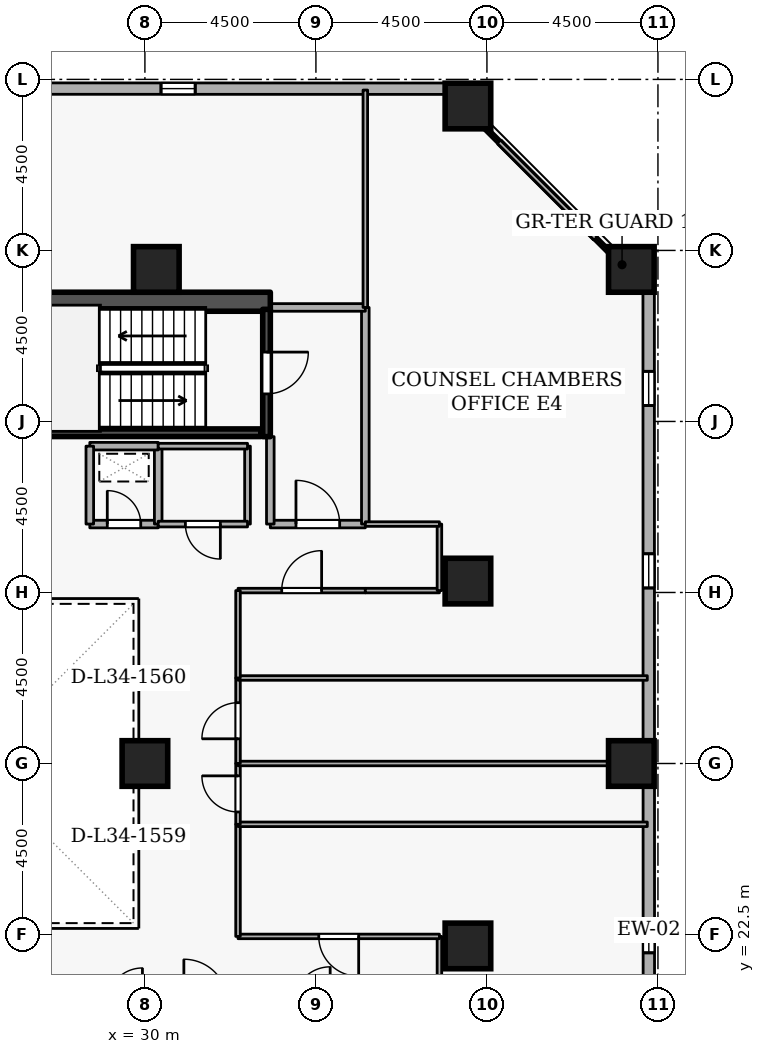
"""IFC4 building model, lengths in metres.
Left out: names, types, materials, properties, quantities, classifications, styles, units other than length and angle.
Written with IfcOpenShell. Run it as: python <this file> out.ifc"""

import sys

from ifc_helpers import new_model, si_unit, direction, frame, frame_2d, origin, origin_2d, place, context, subcontext, project, spatial, rectangle, extrude, element, fill, save


model = new_model("IFC4")
c1 = context("Model", 3, precision=1e-05, world=origin(), true_north=direction((0.0, 1.0)))
c2 = subcontext(c1, "Body", "Model", "MODEL_VIEW")
j1 = project(units=[si_unit("LENGTHUNIT", "METRE"), si_unit("PLANEANGLEUNIT", "RADIAN")], contexts=[c1])
p1 = place(None, origin())
s1 = spatial("IfcSite", under=j1, at=p1, CompositionType="ELEMENT")
p2 = place(p1, origin())
s2 = spatial("IfcBuilding", under=s1, at=p2, CompositionType="ELEMENT")
p3 = place(p2, frame((0.0, 0.0, 130.5)))
s3 = spatial("IfcBuildingStorey", under=s2, at=p3, CompositionType="ELEMENT", Elevation=130.5)
p4 = place(p3, frame((17.7, 39.15, 0.0), z_axis=(0.0, 0.0, 1.0), x_axis=(1.0, 0.0, 0.0)))
e1 = element("IfcWall", 1, at=p4, inside=s3, PredefinedType="SHEAR", context=c2, shape_type="SweptSolid", body=[
    extrude(rectangle(XDim=15.6, YDim=0.5, at=frame_2d((7.8, 0.0))), origin(), (0.0, 0.0, 1.0), 3.6),
])
for number, where, z_axis, x_axis in (
    (2, (42.8, 27.0, 0.0), (0.0, 0.0, 1.0), (1.0, 0.0, 0.0)),
    (3, (42.8, 40.0, 0.0), (0.0, 0.0, 1.0), (1.0, 0.0, 0.0)),
    (4, (38.5, 44.3, 0.0), (0.0, 0.0, 1.0), (1.0, 0.0, 0.0)),
    (5, (38.5, 22.2, 0.0), (0.0, 0.0, 1.0), (1.0, 0.0, 0.0)),
    (6, (38.5, 31.8, 0.0), (0.0, 0.0, 1.0), (1.0, 0.0, 0.0)),
    (7, (30.3, 40.0, 0.0), (0.0, 0.0, 1.0), (1.0, 0.0, 0.0)),
    (8, (30.0, 27.0, 0.0), (0.0, 0.0, 1.0), (1.0, 0.0, 0.0)),
):
    element("IfcColumn", number, at=place(p3, frame(where, z_axis=z_axis, x_axis=x_axis)), inside=s3, PredefinedType="COLUMN", context=c2, shape_type="SweptSolid", body=[
        extrude(rectangle(XDim=1.2, YDim=1.2, at=origin_2d()), origin(), (0.0, 0.0, 1.0), 3.6),
    ])
p5 = place(p3, frame((43.265, 5.819, 0.0), z_axis=(0.0, 0.0, 1.0), x_axis=(-0.000268805477, 0.999999963872, 0.0)))
e9 = element("IfcWall", 9, at=p5, inside=s3, PredefinedType="STANDARD", context=c2, shape_type="SweptSolid", body=[
    extrude(rectangle(XDim=33.605, YDim=0.3, at=frame_2d((16.802, 0.0))), origin(), (0.0, 0.0, 1.0), 2.7),
])
p6 = place(p5, frame((1.8, 0.0, 0.72)))
e10 = element("IfcOpeningElement", 10, at=p6, cuts=e9, PredefinedType="OPENING", context=c2, shape_type="SweptSolid", body=[
    extrude(rectangle(XDim=0.9, YDim=1.75, at=frame_2d((0.45, 0.875))), frame((0.0, 0.16, 0.0), z_axis=(0.0, -1.0, 0.0), x_axis=(1.0, 0.0, 0.0)), (0.0, 0.0, 1.0), 0.32),
])
p7 = place(p5, frame((11.4, 0.0, 0.72)))
e11 = element("IfcOpeningElement", 11, at=p7, cuts=e9, PredefinedType="OPENING", context=c2, shape_type="SweptSolid", body=[
    extrude(rectangle(XDim=0.9, YDim=1.75, at=frame_2d((0.45, 0.875))), frame((0.0, 0.16, 0.0), z_axis=(0.0, -1.0, 0.0), x_axis=(1.0, 0.0, 0.0)), (0.0, 0.0, 1.0), 0.32),
])
p8 = place(p5, frame((16.2, 0.0, 0.72)))
e12 = element("IfcOpeningElement", 12, at=p8, cuts=e9, PredefinedType="OPENING", context=c2, shape_type="SweptSolid", body=[
    extrude(rectangle(XDim=0.9, YDim=1.75, at=frame_2d((0.45, 0.875))), frame((0.0, 0.16, 0.0), z_axis=(0.0, -1.0, 0.0), x_axis=(1.0, 0.0, 0.0)), (0.0, 0.0, 1.0), 0.32),
])
p9 = place(p5, frame((25.8, 0.0, 0.72)))
e13 = element("IfcOpeningElement", 13, at=p9, cuts=e9, PredefinedType="OPENING", context=c2, shape_type="SweptSolid", body=[
    extrude(rectangle(XDim=0.9, YDim=1.75, at=frame_2d((0.45, 0.875))), frame((0.0, 0.16, 0.0), z_axis=(0.0, -1.0, 0.0), x_axis=(1.0, 0.0, 0.0)), (0.0, 0.0, 1.0), 0.32),
])
p10 = place(p5, frame((30.6, 0.0, 0.72)))
e14 = element("IfcOpeningElement", 14, at=p10, cuts=e9, PredefinedType="OPENING", context=c2, shape_type="SweptSolid", body=[
    extrude(rectangle(XDim=0.9, YDim=1.75, at=frame_2d((0.45, 0.875))), frame((0.0, 0.16, 0.0), z_axis=(0.0, -1.0, 0.0), x_axis=(1.0, 0.0, 0.0)), (0.0, 0.0, 1.0), 0.32),
])
p11 = place(p3, frame((37.924, 44.756, 0.0), z_axis=(0.0, 0.0, 1.0), x_axis=(-0.999999963872, 0.000268805477, 0.0)))
e15 = element("IfcWall", 15, at=p11, inside=s3, PredefinedType="STANDARD", context=c2, shape_type="SweptSolid", body=[
    extrude(rectangle(XDim=33.605, YDim=0.3, at=frame_2d((16.802, 0.0))), origin(), (0.0, 0.0, 1.0), 2.7),
])
p12 = place(p11, frame((6.6, 0.0, 0.72)))
e16 = element("IfcOpeningElement", 16, at=p12, cuts=e15, PredefinedType="OPENING", context=c2, shape_type="SweptSolid", body=[
    extrude(rectangle(XDim=0.9, YDim=1.75, at=frame_2d((0.45, 0.875))), frame((0.0, 0.16, 0.0), z_axis=(0.0, -1.0, 0.0), x_axis=(1.0, 0.0, 0.0)), (0.0, 0.0, 1.0), 0.32),
])
p13 = place(p11, frame((16.2, 0.0, 0.72)))
e17 = element("IfcOpeningElement", 17, at=p13, cuts=e15, PredefinedType="OPENING", context=c2, shape_type="SweptSolid", body=[
    extrude(rectangle(XDim=0.9, YDim=1.75, at=frame_2d((0.45, 0.875))), frame((0.0, 0.16, 0.0), z_axis=(0.0, -1.0, 0.0), x_axis=(1.0, 0.0, 0.0)), (0.0, 0.0, 1.0), 0.32),
])
p14 = place(p11, frame((21.0, 0.0, 0.72)))
e18 = element("IfcOpeningElement", 18, at=p14, cuts=e15, PredefinedType="OPENING", context=c2, shape_type="SweptSolid", body=[
    extrude(rectangle(XDim=0.9, YDim=1.75, at=frame_2d((0.45, 0.875))), frame((0.0, 0.16, 0.0), z_axis=(0.0, -1.0, 0.0), x_axis=(1.0, 0.0, 0.0)), (0.0, 0.0, 1.0), 0.32),
])
p15 = place(p11, frame((30.6, 0.0, 0.72)))
e19 = element("IfcOpeningElement", 19, at=p15, cuts=e15, PredefinedType="OPENING", context=c2, shape_type="SweptSolid", body=[
    extrude(rectangle(XDim=0.9, YDim=1.75, at=frame_2d((0.45, 0.875))), frame((0.0, 0.16, 0.0), z_axis=(0.0, -1.0, 0.0), x_axis=(1.0, 0.0, 0.0)), (0.0, 0.0, 1.0), 0.32),
])
p16 = place(p3, frame((33.2, 38.95, 0.0), z_axis=(0.0, 0.0, 1.0), x_axis=(0.0, -1.0, 0.0)))
e20 = element("IfcWall", 20, at=p16, inside=s3, PredefinedType="SHEAR", context=c2, shape_type="SweptSolid", body=[
    extrude(rectangle(XDim=3.35, YDim=0.2, at=frame_2d((1.675, 0.0))), origin(), (0.0, 0.0, 1.0), 3.6),
])
p17 = place(p16, frame((1.125, 0.0, 0.0)))
e21 = element("IfcOpeningElement", 21, at=p17, cuts=e20, PredefinedType="OPENING", context=c2, shape_type="SweptSolid", body=[
    extrude(rectangle(XDim=1.1, YDim=2.1, at=frame_2d((0.55, 1.05))), frame((0.0, 0.11, 0.0), z_axis=(0.0, -1.0, 0.0), x_axis=(1.0, 0.0, 0.0)), (0.0, 0.0, 1.0), 0.22),
])
p18 = place(p3, frame((25.95, 35.703, 0.0), z_axis=(0.0, 0.0, 1.0), x_axis=(1.0, 0.0, 0.0)))
e22 = element("IfcWall", 22, at=p18, inside=s3, PredefinedType="SHEAR", context=c2, shape_type="SweptSolid", body=[
    extrude(rectangle(XDim=7.1, YDim=0.2, at=frame_2d((3.55, 0.0))), origin(), (0.0, 0.0, 1.0), 3.6),
])
p19 = place(p3, frame((33.3, 33.3, 0.0), z_axis=(0.0, 0.0, 1.0), x_axis=(1.0, 0.0, 0.0)))
e23 = element("IfcWall", 23, at=p19, inside=s3, PredefinedType="STANDARD", context=c2, shape_type="SweptSolid", body=[
    extrude(rectangle(XDim=2.5, YDim=0.2, at=frame_2d((1.25, 0.0))), origin(), (0.0, 0.0, 1.0), 3.34),
])
p20 = place(p19, frame((0.675, 0.0, 0.0)))
e24 = element("IfcOpeningElement", 24, at=p20, cuts=e23, PredefinedType="OPENING", context=c2, shape_type="SweptSolid", body=[
    extrude(rectangle(XDim=1.15, YDim=2.1, at=frame_2d((0.575, 1.05))), frame((0.0, 0.11, 0.0), z_axis=(0.0, -1.0, 0.0), x_axis=(1.0, 0.0, 0.0)), (0.0, 0.0, 1.0), 0.22),
])
p21 = place(p3, frame((35.8, 33.3, 0.0), z_axis=(0.0, 0.0, 1.0), x_axis=(0.0, 1.0, 0.0)))
e25 = element("IfcWall", 25, at=p21, inside=s3, PredefinedType="STANDARD", context=c2, shape_type="SweptSolid", body=[
    extrude(rectangle(XDim=5.7, YDim=0.2, at=frame_2d((2.85, 0.0))), origin(), (0.0, 0.0, 1.0), 3.34),
])
p22 = place(p3, frame((35.8, 39.0, 0.0), z_axis=(0.0, 0.0, 1.0), x_axis=(-1.0, 0.0, 0.0)))
e26 = element("IfcWall", 26, at=p22, inside=s3, PredefinedType="STANDARD", context=c2, shape_type="SweptSolid", body=[
    extrude(rectangle(XDim=2.5, YDim=0.2, at=frame_2d((1.25, 0.0))), origin(), (0.0, 0.0, 1.0), 3.34),
])
p23 = place(p3, frame((33.3, 35.6, 0.0), z_axis=(0.0, 0.0, 1.0), x_axis=(0.0, -1.0, 0.0)))
e27 = element("IfcWall", 27, at=p23, inside=s3, PredefinedType="STANDARD", context=c2, shape_type="SweptSolid", body=[
    extrude(rectangle(XDim=2.3, YDim=0.2, at=frame_2d((1.15, 0.0))), origin(), (0.0, 0.0, 1.0), 2.545),
])
p24 = place(p3, frame((28.55, 33.3, 0.0), z_axis=(0.0, 0.0, 1.0), x_axis=(1.0, 0.0, 0.0)))
e28 = element("IfcWall", 28, at=p24, inside=s3, PredefinedType="STANDARD", context=c2, shape_type="SweptSolid", body=[
    extrude(rectangle(XDim=1.8, YDim=0.2, at=frame_2d((0.9, 0.0))), origin(), (0.0, 0.0, 1.0), 3.34),
])
p25 = place(p24, frame((0.46, 0.0, 0.0)))
e29 = element("IfcOpeningElement", 29, at=p25, cuts=e28, PredefinedType="OPENING", context=c2, shape_type="SweptSolid", body=[
    extrude(rectangle(XDim=0.88, YDim=2.04, at=frame_2d((0.44, 1.02))), frame((0.0, 0.11, 0.0), z_axis=(0.0, -1.0, 0.0), x_axis=(1.0, 0.0, 0.0)), (0.0, 0.0, 1.0), 0.22),
])
p26 = place(p3, frame((30.35, 33.3, 0.0), z_axis=(0.0, 0.0, 1.0), x_axis=(0.0, 1.0, 0.0)))
e30 = element("IfcWall", 30, at=p26, inside=s3, PredefinedType="STANDARD", context=c2, shape_type="SweptSolid", body=[
    extrude(rectangle(XDim=2.05, YDim=0.2, at=frame_2d((1.025, 0.0))), origin(), (0.0, 0.0, 1.0), 3.34),
])
p27 = place(p3, frame((30.35, 35.35, 0.0), z_axis=(0.0, 0.0, 1.0), x_axis=(-1.0, 0.0, 0.0)))
e31 = element("IfcWall", 31, at=p27, inside=s3, PredefinedType="STANDARD", context=c2, shape_type="SweptSolid", body=[
    extrude(rectangle(XDim=1.8, YDim=0.2, at=frame_2d((0.9, 0.0))), origin(), (0.0, 0.0, 1.0), 3.34),
])
p28 = place(p3, frame((28.55, 35.35, 0.0), z_axis=(0.0, 0.0, 1.0), x_axis=(0.0, -1.0, 0.0)))
e32 = element("IfcWall", 32, at=p28, inside=s3, PredefinedType="STANDARD", context=c2, shape_type="SweptSolid", body=[
    extrude(rectangle(XDim=2.05, YDim=0.2, at=frame_2d((1.025, 0.0))), origin(), (0.0, 0.0, 1.0), 3.34),
])
p29 = place(p3, frame((32.7, 35.35, 0.0), z_axis=(0.0, 0.0, 1.0), x_axis=(0.0, -1.0, 0.0)))
e33 = element("IfcWall", 33, at=p29, inside=s3, PredefinedType="PARTITIONING", context=c2, shape_type="SweptSolid", body=[
    extrude(rectangle(XDim=2.05, YDim=0.15, at=frame_2d((1.025, 0.0))), origin(), (0.0, 0.0, 1.0), 2.545),
])
p30 = place(p3, frame((32.7, 33.3, 0.0), z_axis=(0.0, 0.0, 1.0), x_axis=(-1.0, 0.0, 0.0)))
e34 = element("IfcWall", 34, at=p30, inside=s3, PredefinedType="PARTITIONING", context=c2, shape_type="SweptSolid", body=[
    extrude(rectangle(XDim=2.35, YDim=0.15, at=frame_2d((1.175, 0.0))), origin(), (0.0, 0.0, 1.0), 3.34),
])
p31 = place(p30, frame((0.715, 0.0, 0.0)))
e35 = element("IfcOpeningElement", 35, at=p31, cuts=e34, PredefinedType="OPENING", context=c2, shape_type="SweptSolid", body=[
    extrude(rectangle(XDim=0.92, YDim=2.08, at=frame_2d((0.46, 1.04))), frame((0.0, 0.085, 0.0), z_axis=(0.0, -1.0, 0.0), x_axis=(1.0, 0.0, 0.0)), (0.0, 0.0, 1.0), 0.17),
])
p32 = place(p3, frame((30.35, 35.35, 0.0), z_axis=(0.0, 0.0, 1.0), x_axis=(1.0, 0.0, 0.0)))
e36 = element("IfcWall", 36, at=p32, inside=s3, PredefinedType="PARTITIONING", context=c2, shape_type="SweptSolid", body=[
    extrude(rectangle(XDim=2.35, YDim=0.15, at=frame_2d((1.175, 0.0))), origin(), (0.0, 0.0, 1.0), 3.34),
])
p33 = place(p3, frame((37.75, 20.7, 0.0), z_axis=(0.0, 0.0, 1.0), x_axis=(0.0, 1.0, 0.0)))
e37 = element("IfcWall", 37, at=p33, inside=s3, PredefinedType="PARTITIONING", context=c2, shape_type="SweptSolid", body=[
    extrude(rectangle(XDim=1.75, YDim=0.12, at=frame_2d((0.875, 0.0))), origin(), (0.0, 0.0, 1.0), 3.34),
])
p34 = place(p3, frame((37.75, 22.45, 0.0), z_axis=(0.0, 0.0, 1.0), x_axis=(-1.0, 0.0, 0.0)))
e38 = element("IfcWall", 38, at=p34, inside=s3, PredefinedType="PARTITIONING", context=c2, shape_type="SweptSolid", body=[
    extrude(rectangle(XDim=5.3, YDim=0.12, at=frame_2d((2.65, 0.0))), origin(), (0.0, 0.0, 1.0), 3.34),
])
p35 = place(p34, frame((2.125, 0.0, 0.0)))
e39 = element("IfcOpeningElement", 39, at=p35, cuts=e38, PredefinedType="OPENING", context=c2, shape_type="SweptSolid", body=[
    extrude(rectangle(XDim=1.05, YDim=2.1, at=frame_2d((0.525, 1.05))), frame((0.0, 0.07, 0.0), z_axis=(0.0, -1.0, 0.0), x_axis=(1.0, 0.0, 0.0)), (0.0, 0.0, 1.0), 0.14),
])
p36 = place(p3, frame((32.45, 22.45, 0.0), z_axis=(0.0, 0.0, 1.0), x_axis=(0.0, 1.0, 0.0)))
e40 = element("IfcWall", 40, at=p36, inside=s3, PredefinedType="PARTITIONING", context=c2, shape_type="SweptSolid", body=[
    extrude(rectangle(XDim=2.95, YDim=0.12, at=frame_2d((1.475, 0.0))), origin(), (0.0, 0.0, 1.0), 3.34),
])
p37 = place(p3, frame((32.45, 25.4, 0.0), z_axis=(0.0, 0.0, 1.0), x_axis=(1.0, 0.0, 0.0)))
e41 = element("IfcWall", 41, at=p37, inside=s3, PredefinedType="PARTITIONING", context=c2, shape_type="SweptSolid", body=[
    extrude(rectangle(XDim=10.77, YDim=0.12, at=frame_2d((5.385, 0.0))), origin(), (0.0, 0.0, 1.0), 3.34),
])
p38 = place(p3, frame((32.45, 25.4, 0.0), z_axis=(0.0, 0.0, 1.0), x_axis=(0.0, 1.0, 0.0)))
e42 = element("IfcWall", 42, at=p38, inside=s3, PredefinedType="PARTITIONING", context=c2, shape_type="SweptSolid", body=[
    extrude(rectangle(XDim=1.6, YDim=0.12, at=frame_2d((0.8, 0.0))), origin(), (0.0, 0.0, 1.0), 3.34),
])
p39 = place(p38, frame((0.325, 0.0, 0.0)))
e43 = element("IfcOpeningElement", 43, at=p39, cuts=e42, PredefinedType="OPENING", context=c2, shape_type="SweptSolid", body=[
    extrude(rectangle(XDim=0.95, YDim=2.1, at=frame_2d((0.475, 1.05))), frame((0.0, 0.07, 0.0), z_axis=(0.0, -1.0, 0.0), x_axis=(1.0, 0.0, 0.0)), (0.0, 0.0, 1.0), 0.14),
])
p40 = place(p3, frame((32.45, 27.0, 0.0), z_axis=(0.0, 0.0, 1.0), x_axis=(1.0, 0.0, 0.0)))
e44 = element("IfcWall", 44, at=p40, inside=s3, PredefinedType="PARTITIONING", context=c2, shape_type="SweptSolid", body=[
    extrude(rectangle(XDim=10.77, YDim=0.12, at=frame_2d((5.385, 0.0))), origin(), (0.0, 0.0, 1.0), 2.878),
])
p41 = place(p3, frame((32.45, 27.0, 0.0), z_axis=(0.0, 0.0, 1.0), x_axis=(0.0, 1.0, 0.0)))
e45 = element("IfcWall", 45, at=p41, inside=s3, PredefinedType="PARTITIONING", context=c2, shape_type="SweptSolid", body=[
    extrude(rectangle(XDim=2.25, YDim=0.12, at=frame_2d((1.125, 0.0))), origin(), (0.0, 0.0, 1.0), 3.34),
])
p42 = place(p41, frame((0.65, 0.0, 0.0)))
e46 = element("IfcOpeningElement", 46, at=p42, cuts=e45, PredefinedType="OPENING", context=c2, shape_type="SweptSolid", body=[
    extrude(rectangle(XDim=0.95, YDim=2.1, at=frame_2d((0.475, 1.05))), frame((0.0, 0.07, 0.0), z_axis=(0.0, -1.0, 0.0), x_axis=(1.0, 0.0, 0.0)), (0.0, 0.0, 1.0), 0.14),
])
p43 = place(p3, frame((32.45, 29.25, 0.0), z_axis=(0.0, 0.0, 1.0), x_axis=(1.0, 0.0, 0.0)))
e47 = element("IfcWall", 47, at=p43, inside=s3, PredefinedType="PARTITIONING", context=c2, shape_type="SweptSolid", body=[
    extrude(rectangle(XDim=10.77, YDim=0.12, at=frame_2d((5.385, 0.0))), origin(), (0.0, 0.0, 1.0), 3.34),
])
p44 = place(p3, frame((32.45, 31.55, 0.0), z_axis=(0.0, 0.0, 1.0), x_axis=(1.0, 0.0, 0.0)))
e48 = element("IfcWall", 48, at=p44, inside=s3, PredefinedType="PARTITIONING", context=c2, shape_type="SweptSolid", body=[
    extrude(rectangle(XDim=3.35, YDim=0.12, at=frame_2d((1.675, 0.0))), origin(), (0.0, 0.0, 1.0), 3.34),
])
p45 = place(p44, frame((1.15, 0.0, 0.0)))
e49 = element("IfcOpeningElement", 49, at=p45, cuts=e48, PredefinedType="OPENING", context=c2, shape_type="SweptSolid", body=[
    extrude(rectangle(XDim=1.05, YDim=2.1, at=frame_2d((0.525, 1.05))), frame((0.0, 0.07, 0.0), z_axis=(0.0, -1.0, 0.0), x_axis=(1.0, 0.0, 0.0)), (0.0, 0.0, 1.0), 0.14),
])
p46 = place(p3, frame((35.8, 31.55, 0.0), z_axis=(0.0, 0.0, 1.0), x_axis=(1.0, 0.0, 0.0)))
e50 = element("IfcWall", 50, at=p46, inside=s3, PredefinedType="PARTITIONING", context=c2, shape_type="SweptSolid", body=[
    extrude(rectangle(XDim=1.95, YDim=0.12, at=frame_2d((0.975, 0.0))), origin(), (0.0, 0.0, 1.0), 3.34),
])
p47 = place(p3, frame((37.75, 31.55, 0.0), z_axis=(0.0, 0.0, 1.0), x_axis=(0.0, 1.0, 0.0)))
e51 = element("IfcWall", 51, at=p47, inside=s3, PredefinedType="PARTITIONING", context=c2, shape_type="SweptSolid", body=[
    extrude(rectangle(XDim=1.75, YDim=0.12, at=frame_2d((0.875, 0.0))), origin(), (0.0, 0.0, 1.0), 3.34),
])
p48 = place(p3, frame((37.75, 33.3, 0.0), z_axis=(0.0, 0.0, 1.0), x_axis=(-1.0, 0.0, 0.0)))
e52 = element("IfcWall", 52, at=p48, inside=s3, PredefinedType="PARTITIONING", context=c2, shape_type="SweptSolid", body=[
    extrude(rectangle(XDim=1.95, YDim=0.12, at=frame_2d((0.975, 0.0))), origin(), (0.0, 0.0, 1.0), 3.34),
])
p49 = place(p3, frame((35.8, 39.0, 0.0), z_axis=(0.0, 0.0, 1.0), x_axis=(0.0, 1.0, 0.0)))
e53 = element("IfcWall", 53, at=p49, inside=s3, PredefinedType="PARTITIONING", context=c2, shape_type="SweptSolid", body=[
    extrude(rectangle(XDim=5.72, YDim=0.12, at=frame_2d((2.86, 0.0))), origin(), (0.0, 0.0, 1.0), 3.34),
])
p50 = place(p3, frame((37.956, 44.72, 0.0), z_axis=(0.0, 0.0, 1.0), x_axis=(0.707106781187, -0.707106781187, 0.0)))
e54 = element("IfcWall", 54, at=p50, inside=s3, PredefinedType="PARTITIONING", context=c2, shape_type="SweptSolid", body=[
    extrude(rectangle(XDim=7.444, YDim=0.12, at=frame_2d((3.722, 0.0))), origin(), (0.0, 0.0, 1.0), 3.34),
])
p51 = place(p3, frame((32.45, 29.25, 0.0), z_axis=(0.0, 0.0, 1.0), x_axis=(0.0, 1.0, 0.0)))
e55 = element("IfcWall", 55, at=p51, inside=s3, PredefinedType="PARTITIONING", context=c2, shape_type="SweptSolid", body=[
    extrude(rectangle(XDim=2.3, YDim=0.12, at=frame_2d((1.15, 0.0))), origin(), (0.0, 0.0, 1.0), 3.34),
])
p52 = place(p8, origin())
e56 = element("IfcWindow", 56, at=p52, inside=s3, PartitioningType="SINGLE_PANEL", PredefinedType="WINDOW", context=c2, shape_type="SweptSolid", body=[
    extrude(rectangle(XDim=0.9, YDim=1.75, at=frame_2d((0.45, 0.875))), frame((0.0, 0.03, 0.0), z_axis=(0.0, -1.0, 0.0), x_axis=(1.0, 0.0, 0.0)), (0.0, 0.0, 1.0), 0.06),
])
fill(e12, e56)
p53 = place(p9, origin())
e57 = element("IfcWindow", 57, at=p53, inside=s3, PartitioningType="SINGLE_PANEL", PredefinedType="WINDOW", context=c2, shape_type="SweptSolid", body=[
    extrude(rectangle(XDim=0.9, YDim=1.75, at=frame_2d((0.45, 0.875))), frame((0.0, 0.03, 0.0), z_axis=(0.0, -1.0, 0.0), x_axis=(1.0, 0.0, 0.0)), (0.0, 0.0, 1.0), 0.06),
])
fill(e13, e57)
p54 = place(p10, origin())
e58 = element("IfcWindow", 58, at=p54, inside=s3, PartitioningType="SINGLE_PANEL", PredefinedType="WINDOW", context=c2, shape_type="SweptSolid", body=[
    extrude(rectangle(XDim=0.9, YDim=1.75, at=frame_2d((0.45, 0.875))), frame((0.0, 0.03, 0.0), z_axis=(0.0, -1.0, 0.0), x_axis=(1.0, 0.0, 0.0)), (0.0, 0.0, 1.0), 0.06),
])
fill(e14, e58)
p55 = place(p12, origin())
e59 = element("IfcWindow", 59, at=p55, inside=s3, PartitioningType="SINGLE_PANEL", PredefinedType="WINDOW", context=c2, shape_type="SweptSolid", body=[
    extrude(rectangle(XDim=0.9, YDim=1.75, at=frame_2d((0.45, 0.875))), frame((0.0, 0.03, 0.0), z_axis=(0.0, -1.0, 0.0), x_axis=(1.0, 0.0, 0.0)), (0.0, 0.0, 1.0), 0.06),
])
fill(e16, e59)
p56 = place(p17, origin())
e60 = element("IfcDoor", 60, at=p56, inside=s3, OperationType="SINGLE_SWING_LEFT", PredefinedType="DOOR", context=c2, shape_type="SweptSolid", body=[
    extrude(rectangle(XDim=1.1, YDim=2.1, at=frame_2d((0.55, 1.05))), frame((0.0, 0.025, 0.0), z_axis=(0.0, -1.0, 0.0), x_axis=(1.0, 0.0, 0.0)), (0.0, 0.0, 1.0), 0.05),
])
fill(e21, e60)
p57 = place(p20, origin())
e61 = element("IfcDoor", 61, at=p57, inside=s3, OperationType="SINGLE_SWING_LEFT", PredefinedType="DOOR", context=c2, shape_type="SweptSolid", body=[
    extrude(rectangle(XDim=1.15, YDim=2.1, at=frame_2d((0.575, 1.05))), frame((0.0, 0.025, 0.0), z_axis=(0.0, -1.0, 0.0), x_axis=(1.0, 0.0, 0.0)), (0.0, 0.0, 1.0), 0.05),
])
fill(e24, e61)
p58 = place(p25, origin())
e62 = element("IfcDoor", 62, at=p58, inside=s3, OperationType="SINGLE_SWING_LEFT", PredefinedType="DOOR", context=c2, shape_type="SweptSolid", body=[
    extrude(rectangle(XDim=0.88, YDim=2.04, at=frame_2d((0.44, 1.02))), frame((0.0, 0.025, 0.0), z_axis=(0.0, -1.0, 0.0), x_axis=(1.0, 0.0, 0.0)), (0.0, 0.0, 1.0), 0.05),
])
fill(e29, e62)
p59 = place(p31, origin())
e63 = element("IfcDoor", 63, at=p59, inside=s3, OperationType="SINGLE_SWING_LEFT", PredefinedType="DOOR", context=c2, shape_type="SweptSolid", body=[
    extrude(rectangle(XDim=0.92, YDim=2.08, at=frame_2d((0.46, 1.04))), frame((0.0, 0.025, 0.0), z_axis=(0.0, -1.0, 0.0), x_axis=(1.0, 0.0, 0.0)), (0.0, 0.0, 1.0), 0.05),
])
fill(e35, e63)
p60 = place(p35, origin())
e64 = element("IfcDoor", 64, at=p60, inside=s3, OperationType="SINGLE_SWING_LEFT", PredefinedType="DOOR", context=c2, shape_type="SweptSolid", body=[
    extrude(rectangle(XDim=1.05, YDim=2.1, at=frame_2d((0.525, 1.05))), frame((0.0, 0.025, 0.0), z_axis=(0.0, -1.0, 0.0), x_axis=(1.0, 0.0, 0.0)), (0.0, 0.0, 1.0), 0.05),
])
fill(e39, e64)
p61 = place(p39, origin())
e65 = element("IfcDoor", 65, at=p61, inside=s3, OperationType="SINGLE_SWING_RIGHT", PredefinedType="DOOR", context=c2, shape_type="SweptSolid", body=[
    extrude(rectangle(XDim=0.95, YDim=2.1, at=frame_2d((0.475, 1.05))), frame((0.0, 0.025, 0.0), z_axis=(0.0, -1.0, 0.0), x_axis=(1.0, 0.0, 0.0)), (0.0, 0.0, 1.0), 0.05),
])
fill(e43, e65)
p62 = place(p42, origin())
e66 = element("IfcDoor", 66, at=p62, inside=s3, OperationType="SINGLE_SWING_LEFT", PredefinedType="DOOR", context=c2, shape_type="SweptSolid", body=[
    extrude(rectangle(XDim=0.95, YDim=2.1, at=frame_2d((0.475, 1.05))), frame((0.0, 0.025, 0.0), z_axis=(0.0, -1.0, 0.0), x_axis=(1.0, 0.0, 0.0)), (0.0, 0.0, 1.0), 0.05),
])
fill(e46, e66)
p63 = place(p45, origin())
e67 = element("IfcDoor", 67, at=p63, inside=s3, OperationType="SINGLE_SWING_RIGHT", PredefinedType="DOOR", context=c2, shape_type="SweptSolid", body=[
    extrude(rectangle(XDim=1.05, YDim=2.1, at=frame_2d((0.525, 1.05))), frame((0.0, 0.025, 0.0), z_axis=(0.0, -1.0, 0.0), x_axis=(1.0, 0.0, 0.0)), (0.0, 0.0, 1.0), 0.05),
])
fill(e49, e67)
save(model, sys.argv[1])
